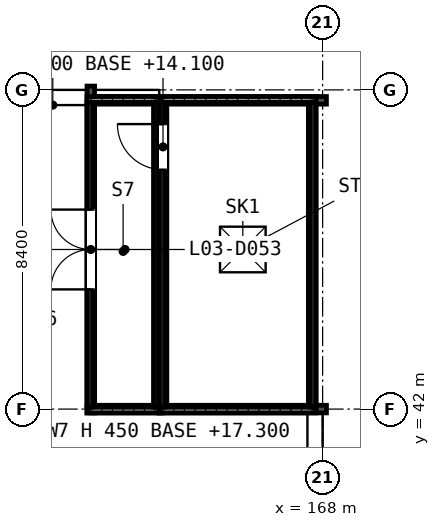
"""IFC4 building model, lengths in metres.
Left out: names, types, materials, properties, quantities, classifications, styles, units other than length and angle.
Written with IfcOpenShell. Run it as: python <this file> out.ifc"""

import sys

from ifc_helpers import new_model, si_unit, direction, frame, frame_2d, origin, origin_2d, place, context, subcontext, project, spatial, rectangle, extrude, element, fill, save


model = new_model("IFC4")
c1 = context("Model", 3, precision=1e-05, world=origin(), true_north=direction((0.0, 1.0)))
c2 = subcontext(c1, "Body", "Model", "MODEL_VIEW")
j1 = project(units=[si_unit("LENGTHUNIT", "METRE"), si_unit("PLANEANGLEUNIT", "RADIAN")], contexts=[c1])
p1 = place(None, origin())
s1 = spatial("IfcSite", under=j1, at=p1, CompositionType="ELEMENT")
p2 = place(p1, origin())
s2 = spatial("IfcBuilding", under=s1, at=p2, CompositionType="ELEMENT")
p3 = place(p2, frame((0.0, 0.0, 14.4)))
s3 = spatial("IfcBuildingStorey", under=s2, at=p3, CompositionType="ELEMENT", Elevation=14.4)
for number, where, z_axis, x_axis in (
    (1, (163.7, 42.0, -0.3), (0.0, 0.0, 1.0), (1.0, 0.0, 0.0)),
    (2, (163.7, 50.125, -0.3), (0.0, 0.0, 1.0), (1.0, 0.0, 0.0)),
):
    element("IfcWall", number, at=place(p3, frame(where, z_axis=z_axis, x_axis=x_axis)), inside=s3, PredefinedType="SHEAR", context=c2, shape_type="SweptSolid", body=[
        extrude(rectangle(XDim=4.4, YDim=0.2, at=frame_2d((2.2, 0.0))), origin(), (0.0, 0.0, 1.0), 3.0),
    ])
p4 = place(p3, frame((163.8, 42.1, -0.3), z_axis=(0.0, 0.0, 1.0), x_axis=(0.0, 1.0, 0.0)))
e3 = element("IfcWall", 3, at=p4, inside=s3, PredefinedType="SHEAR", context=c2, shape_type="SweptSolid", body=[
    extrude(rectangle(XDim=7.925, YDim=0.2, at=frame_2d((3.962, 0.0))), origin(), (0.0, 0.0, 1.0), 3.0),
])
p5 = place(p4, frame((6.2, 0.0, 0.3)))
e4 = element("IfcOpeningElement", 4, at=p5, cuts=e3, PredefinedType="OPENING", context=c2, shape_type="SweptSolid", body=[
    extrude(rectangle(XDim=1.2, YDim=2.2, at=frame_2d((0.6, 1.1))), frame((0.0, 0.11, 0.0), z_axis=(0.0, -1.0, 0.0), x_axis=(1.0, 0.0, 0.0)), (0.0, 0.0, 1.0), 0.22),
])
p6 = place(p3, frame((167.725, 42.1, -0.3), z_axis=(0.0, 0.0, 1.0), x_axis=(0.0, 1.0, 0.0)))
e5 = element("IfcWall", 5, at=p6, inside=s3, PredefinedType="SHEAR", context=c2, shape_type="SweptSolid", body=[
    extrude(rectangle(XDim=7.925, YDim=0.2, at=frame_2d((3.962, 0.0))), origin(), (0.0, 0.0, 1.0), 3.0),
])
for number, where, z_axis, x_axis in (
    (6, (163.8, 42.0, -0.3), (0.0, 0.0, 1.0), (-1.0, 0.0, 0.0)),
    (7, (163.8, 50.125, -0.3), (0.0, 0.0, 1.0), (-1.0, 0.0, 0.0)),
):
    element("IfcWall", number, at=place(p3, frame(where, z_axis=z_axis, x_axis=x_axis)), inside=s3, PredefinedType="SHEAR", context=c2, shape_type="SweptSolid", body=[
        extrude(rectangle(XDim=1.9, YDim=0.2, at=frame_2d((0.95, 0.0))), origin(), (0.0, 0.0, 1.0), 3.0),
    ])
p7 = place(p3, frame((161.9, 41.9, -0.3), z_axis=(0.0, 0.0, 1.0), x_axis=(0.0, 1.0, 0.0)))
e8 = element("IfcWall", 8, at=p7, inside=s3, PredefinedType="SHEAR", context=c2, shape_type="SweptSolid", body=[
    extrude(rectangle(XDim=8.6, YDim=0.2, at=frame_2d((4.3, 0.0))), origin(), (0.0, 0.0, 1.0), 3.0),
])
p8 = place(p7, frame((3.25, 0.0, 0.3)))
e9 = element("IfcOpeningElement", 9, at=p8, cuts=e8, PredefinedType="OPENING", context=c2, shape_type="SweptSolid", body=[
    extrude(rectangle(XDim=2.1, YDim=2.2, at=frame_2d((1.05, 1.1))), frame((0.0, 0.11, 0.0), z_axis=(0.0, -1.0, 0.0), x_axis=(1.0, 0.0, 0.0)), (0.0, 0.0, 1.0), 0.22),
])
for number, where, z_axis, x_axis in (
    (10, (163.7, 41.975, 2.9), (0.0, 0.0, 1.0), (1.0, 0.0, 0.0)),
    (11, (163.7, 50.15, 2.9), (0.0, 0.0, 1.0), (1.0, 0.0, 0.0)),
):
    element("IfcWall", number, at=place(p3, frame(where, z_axis=z_axis, x_axis=x_axis)), inside=s3, PredefinedType="PARAPET", context=c2, shape_type="SweptSolid", body=[
        extrude(rectangle(XDim=4.125, YDim=0.15, at=frame_2d((2.062, 0.0))), origin(), (0.0, 0.0, 1.0), 0.45),
    ])
for number, where, z_axis, x_axis in (
    (12, (163.775, 42.05, 2.9), (0.0, 0.0, 1.0), (0.0, 1.0, 0.0)),
    (13, (167.75, 42.05, 2.9), (0.0, 0.0, 1.0), (0.0, 1.0, 0.0)),
):
    element("IfcWall", number, at=place(p3, frame(where, z_axis=z_axis, x_axis=x_axis)), inside=s3, PredefinedType="PARAPET", context=c2, shape_type="SweptSolid", body=[
        extrude(rectangle(XDim=8.025, YDim=0.15, at=frame_2d((4.012, 0.0))), origin(), (0.0, 0.0, 1.0), 0.45),
    ])
for number, where, z_axis, x_axis in (
    (14, (161.8, 41.975, 2.9), (0.0, 0.0, 1.0), (1.0, 0.0, 0.0)),
    (15, (161.8, 50.15, 2.9), (0.0, 0.0, 1.0), (1.0, 0.0, 0.0)),
):
    element("IfcWall", number, at=place(p3, frame(where, z_axis=z_axis, x_axis=x_axis)), inside=s3, PredefinedType="PARAPET", context=c2, shape_type="SweptSolid", body=[
        extrude(rectangle(XDim=1.9, YDim=0.15, at=frame_2d((0.95, 0.0))), origin(), (0.0, 0.0, 1.0), 0.45),
    ])
for number, where, z_axis, x_axis in (
    (16, (161.875, 42.05, 2.9), (0.0, 0.0, 1.0), (0.0, 1.0, 0.0)),
    (17, (163.625, 42.05, 2.9), (0.0, 0.0, 1.0), (0.0, 1.0, 0.0)),
):
    element("IfcWall", number, at=place(p3, frame(where, z_axis=z_axis, x_axis=x_axis)), inside=s3, PredefinedType="PARAPET", context=c2, shape_type="SweptSolid", body=[
        extrude(rectangle(XDim=8.025, YDim=0.15, at=frame_2d((4.012, 0.0))), origin(), (0.0, 0.0, 1.0), 0.45),
    ])
p9 = place(p8, origin())
e18 = element("IfcDoor", 18, at=p9, inside=s3, OperationType="DOUBLE_DOOR_SINGLE_SWING", PredefinedType="DOOR", context=c2, shape_type="SweptSolid", body=[
    extrude(rectangle(XDim=2.1, YDim=0.013, at=frame_2d((1.05, 0.007))), frame((0.0, 0.088, 0.0), z_axis=(0.0, -1.0, 0.0), x_axis=(1.0, 0.0, 0.0)), (0.0, 0.0, 1.0), 0.176),
    extrude(rectangle(XDim=0.075, YDim=2.112, at=frame_2d((0.038, 1.069))), frame((0.0, 0.098, 0.0), z_axis=(0.0, -1.0, 0.0), x_axis=(1.0, 0.0, 0.0)), (0.0, 0.0, 1.0), 0.196),
    extrude(rectangle(XDim=0.075, YDim=2.112, at=frame_2d((2.062, 1.069))), frame((0.0, 0.098, 0.0), z_axis=(0.0, -1.0, 0.0), x_axis=(1.0, 0.0, 0.0)), (0.0, 0.0, 1.0), 0.196),
    extrude(rectangle(XDim=2.1, YDim=0.075, at=frame_2d((1.05, 2.163))), frame((0.0, 0.088, 0.0), z_axis=(0.0, -1.0, 0.0), x_axis=(1.0, 0.0, 0.0)), (0.0, 0.0, 1.0), 0.176),
    extrude(rectangle(XDim=1.95, YDim=2.112, at=frame_2d((1.05, 1.069))), frame((0.0, 0.025, 0.0), z_axis=(0.0, -1.0, 0.0), x_axis=(1.0, 0.0, 0.0)), (0.0, 0.0, 1.0), 0.05),
])
fill(e9, e18)
p10 = place(p5, origin())
e19 = element("IfcDoor", 19, at=p10, inside=s3, OperationType="SINGLE_SWING_LEFT", PredefinedType="DOOR", context=c2, shape_type="SweptSolid", body=[
    extrude(rectangle(XDim=1.2, YDim=2.2, at=frame_2d((0.6, 1.1))), frame((0.0, 0.025, 0.0), z_axis=(0.0, -1.0, 0.0), x_axis=(1.0, 0.0, 0.0)), (0.0, 0.0, 1.0), 0.05),
])
fill(e4, e19)
p11 = place(p3, frame((0.0, 0.0, 2.7)))
p12 = place(p11, frame((165.9, 46.2, 0.0)))
p13 = place(p12, frame((0.0, 0.0, 0.15)))
e20 = element("IfcWindow", 20, at=p13, inside=s3, PartitioningType="SINGLE_PANEL", PredefinedType="SKYLIGHT", context=c2, shape_type="SweptSolid", body=[
    extrude(rectangle(XDim=1.2, YDim=1.2, at=origin_2d()), origin(), (0.0, 0.0, 1.0), 0.05),
])
save(model, sys.argv[1])
